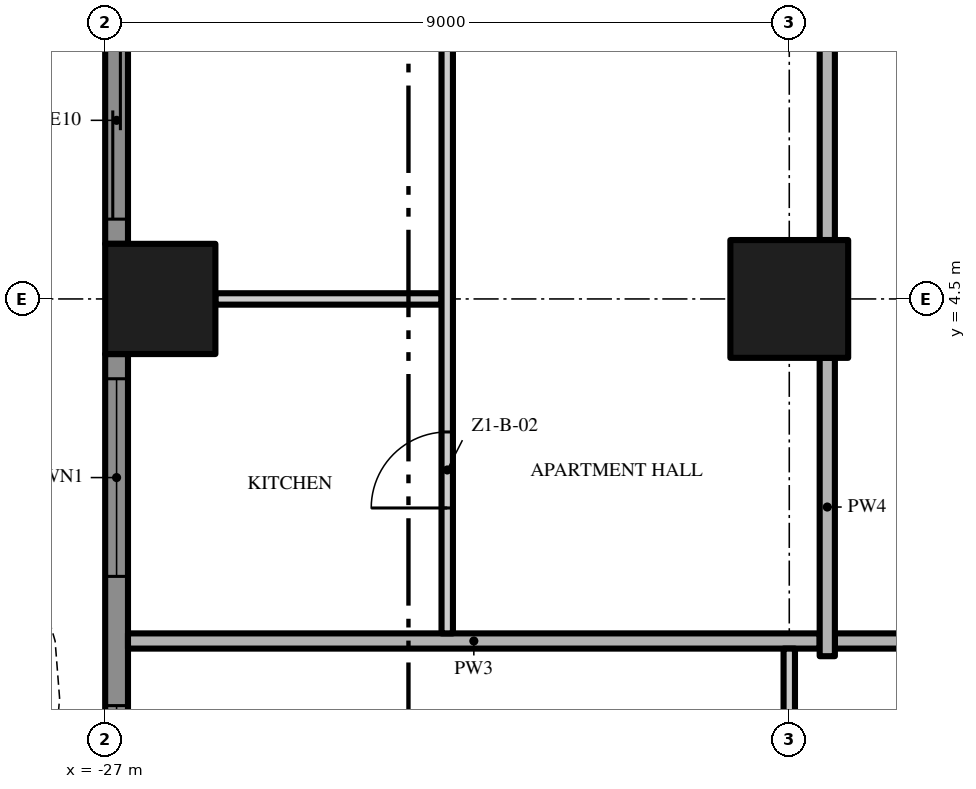
"""IFC4 building model, lengths in metres.
Left out: names, types, materials, properties, quantities, classifications, styles, units other than length and angle.
Written with IfcOpenShell. Run it as: python <this file> out.ifc"""

import sys

from ifc_helpers import new_model, si_unit, direction, frame, frame_2d, origin, origin_2d, place, context, subcontext, project, spatial, polyline, rectangle, outline, extrude, element, fill, save


model = new_model("IFC4")
c1 = context("Model", 3, precision=1e-05, world=origin(), true_north=direction((0.0, 1.0)))
c2 = subcontext(c1, "Body", "Model", "MODEL_VIEW")
j1 = project(units=[si_unit("LENGTHUNIT", "METRE"), si_unit("PLANEANGLEUNIT", "RADIAN")], contexts=[c1])
p1 = place(None, origin())
s1 = spatial("IfcSite", under=j1, at=p1, CompositionType="ELEMENT")
p2 = place(p1, origin())
s2 = spatial("IfcBuilding", under=s1, at=p2, CompositionType="ELEMENT")
p3 = place(p2, frame((0.0, 0.0, 30.2)))
s3 = spatial("IfcBuildingStorey", under=s2, at=p3, CompositionType="ELEMENT", Elevation=30.2)
p4 = place(p3, frame((-18.0, 4.5, 0.0), z_axis=(0.0, 0.0, 1.0), x_axis=(1.0, 0.0, 0.0)))
e1 = element("IfcColumn", 1, at=p4, inside=s3, PredefinedType="COLUMN", context=c2, shape_type="SweptSolid", body=[
    extrude(rectangle(XDim=1.55, YDim=1.55, at=origin_2d()), origin(), (0.0, 0.0, 1.0), 3.5),
])
p5 = place(p3, frame((-26.275, 4.5, 0.0), z_axis=(0.0, 0.0, 1.0), x_axis=(1.0, 0.0, 0.0)))
e2 = element("IfcColumn", 2, at=p5, inside=s3, PredefinedType="COLUMN", context=c2, shape_type="SweptSolid", body=[
    extrude(rectangle(XDim=1.45, YDim=1.45, at=origin_2d()), origin(), (0.0, 0.0, 1.0), 3.5),
])
p6 = place(p3, frame((-26.85, 5.225, 0.0), z_axis=(0.0, 0.0, 1.0), x_axis=(0.0, 1.0, 0.0)))
e3 = element("IfcWall", 3, at=p6, inside=s3, PredefinedType="SOLIDWALL", context=c2, shape_type="SweptSolid", body=[
    extrude(rectangle(XDim=7.55, YDim=0.3, at=frame_2d((3.775, 0.0))), origin(), (0.0, 0.0, 1.0), 3.5),
])
p7 = place(p6, frame((4.625, 0.0, 0.45)))
e4 = element("IfcOpeningElement", 4, at=p7, cuts=e3, PredefinedType="OPENING", context=c2, shape_type="SweptSolid", body=[
    extrude(rectangle(XDim=2.6, YDim=2.65, at=frame_2d((1.3, 1.325))), frame((0.0, 0.16, 0.0), z_axis=(0.0, -1.0, 0.0), x_axis=(1.0, 0.0, 0.0)), (0.0, 0.0, 1.0), 0.32),
])
p8 = place(p6, frame((0.325, 0.0, 0.0)))
e5 = element("IfcOpeningElement", 5, at=p8, cuts=e3, PredefinedType="OPENING", context=c2, shape_type="SweptSolid", body=[
    extrude(rectangle(XDim=2.6, YDim=2.4, at=frame_2d((1.3, 1.2))), frame((0.0, 0.16, 0.0), z_axis=(0.0, -1.0, 0.0), x_axis=(1.0, 0.0, 0.0)), (0.0, 0.0, 1.0), 0.32),
])
p9 = place(p3, frame((-26.85, -3.775, 0.0), z_axis=(0.0, 0.0, 1.0), x_axis=(0.0, 1.0, 0.0)))
e6 = element("IfcWall", 6, at=p9, inside=s3, PredefinedType="SOLIDWALL", context=c2, shape_type="SweptSolid", body=[
    extrude(rectangle(XDim=7.55, YDim=0.3, at=frame_2d((3.775, 0.0))), origin(), (0.0, 0.0, 1.0), 3.5),
])
p10 = place(p9, frame((4.625, 0.0, 0.45)))
e7 = element("IfcOpeningElement", 7, at=p10, cuts=e6, PredefinedType="OPENING", context=c2, shape_type="SweptSolid", body=[
    extrude(rectangle(XDim=2.6, YDim=2.65, at=frame_2d((1.3, 1.325))), frame((0.0, 0.16, 0.0), z_axis=(0.0, -1.0, 0.0), x_axis=(1.0, 0.0, 0.0)), (0.0, 0.0, 1.0), 0.32),
])
p11 = place(p9, frame((0.325, 0.0, 0.45)))
e8 = element("IfcOpeningElement", 8, at=p11, cuts=e6, PredefinedType="OPENING", context=c2, shape_type="SweptSolid", body=[
    extrude(rectangle(XDim=2.6, YDim=2.65, at=frame_2d((1.3, 1.325))), frame((0.0, 0.16, 0.0), z_axis=(0.0, -1.0, 0.0), x_axis=(1.0, 0.0, 0.0)), (0.0, 0.0, 1.0), 0.32),
])
p12 = place(p3, origin())
e9 = element("IfcWall", 9, at=p12, inside=s3, PredefinedType="USERDEFINED", context=c2, shape_type="SweptSolid", body=[
    extrude(outline(polyline([(-28.8, 18.0), (-28.095, 16.5), (-27.659, 15.0), (-27.6, 14.25), (-27.659, 13.5), (-28.095, 12.0), (-28.8, 10.5), (-29.505, 9.0), (-29.941, 7.5), (-30.0, 6.75), (-29.941, 6.0), (-29.505, 4.5), (-28.8, 3.0), (-28.095, 1.5), (-27.659, 0.0), (-27.6, -0.75), (-27.659, -1.5), (-28.095, -3.0), (-28.8, -4.5), (-29.505, -6.0), (-29.941, -7.5), (-30.0, -8.25), (-29.941, -9.0), (-29.505, -10.5), (-28.8, -12.0), (-28.095, -13.5), (-27.659, -15.0), (-27.6, -15.75), (-27.659, -16.5), (-28.095, -18.0), (-27.855, -18.07), (-27.411, -16.545), (-27.349, -15.75), (-27.411, -14.955), (-27.86, -13.411), (-28.574, -11.894), (-29.271, -10.411), (-29.694, -8.955), (-29.749, -8.25), (-29.694, -7.545), (-29.271, -6.089), (-28.574, -4.606), (-27.86, -3.089), (-27.411, -1.545), (-27.349, -0.75), (-27.411, 0.045), (-27.86, 1.589), (-28.574, 3.106), (-29.271, 4.589), (-29.694, 6.045), (-29.749, 6.75), (-29.694, 7.455), (-29.271, 8.911), (-28.574, 10.394), (-27.86, 11.911), (-27.411, 13.455), (-27.349, 14.25), (-27.411, 15.045), (-27.86, 16.589), (-28.574, 18.106), (-28.8, 18.0)])), origin(), (0.0, 0.0, 1.0), 0.9),
])
p13 = place(p3, frame((-17.4, 0.0, 0.0), z_axis=(0.0, 0.0, 1.0), x_axis=(1.0, 0.0, 0.0)))
e10 = element("IfcWall", 10, at=p13, inside=s3, PredefinedType="PARTITIONING", context=c2, shape_type="SweptSolid", body=[
    extrude(rectangle(XDim=12.8, YDim=0.2, at=frame_2d((6.4, 0.0))), origin(), (0.0, 0.0, 1.0), 3.5),
])
p14 = place(p3, frame((-26.7, 0.0, 0.0), z_axis=(0.0, 0.0, 1.0), x_axis=(1.0, 0.0, 0.0)))
e11 = element("IfcWall", 11, at=p14, inside=s3, PredefinedType="PARTITIONING", context=c2, shape_type="SweptSolid", body=[
    extrude(rectangle(XDim=9.1, YDim=0.2, at=frame_2d((4.55, 0.0))), origin(), (0.0, 0.0, 1.0), 3.5),
])
p15 = place(p3, frame((-25.55, 4.5, 0.0), z_axis=(0.0, 0.0, 1.0), x_axis=(1.0, 0.0, 0.0)))
e12 = element("IfcWall", 12, at=p15, inside=s3, PredefinedType="PARTITIONING", context=c2, shape_type="SweptSolid", body=[
    extrude(rectangle(XDim=2.975, YDim=0.15, at=frame_2d((1.488, 0.0))), origin(), (0.0, 0.0, 1.0), 3.5),
])
p16 = place(p3, frame((-22.5, 0.1, 0.0), z_axis=(0.0, 0.0, 1.0), x_axis=(0.0, 1.0, 0.0)))
e13 = element("IfcWall", 13, at=p16, inside=s3, PredefinedType="PARTITIONING", context=c2, shape_type="SweptSolid", body=[
    extrude(rectangle(XDim=17.175, YDim=0.15, at=frame_2d((8.588, 0.0))), origin(), (0.0, 0.0, 1.0), 3.5),
])
p17 = place(p16, frame((1.65, 0.0, 0.0)))
e14 = element("IfcOpeningElement", 14, at=p17, cuts=e13, PredefinedType="OPENING", context=c2, shape_type="SweptSolid", body=[
    extrude(rectangle(XDim=1.0, YDim=2.4, at=frame_2d((0.5, 1.2))), frame((0.0, 0.085, 0.0), z_axis=(0.0, -1.0, 0.0), x_axis=(1.0, 0.0, 0.0)), (0.0, 0.0, 1.0), 0.17),
])
p18 = place(p16, frame((8.0, 0.0, 0.0)))
e15 = element("IfcOpeningElement", 15, at=p18, cuts=e13, PredefinedType="OPENING", context=c2, shape_type="SweptSolid", body=[
    extrude(rectangle(XDim=1.8, YDim=2.4, at=frame_2d((0.9, 1.2))), frame((0.0, 0.085, 0.0), z_axis=(0.0, -1.0, 0.0), x_axis=(1.0, 0.0, 0.0)), (0.0, 0.0, 1.0), 0.17),
])
p19 = place(p16, frame((16.025, 0.0, 0.0)))
e16 = element("IfcOpeningElement", 16, at=p19, cuts=e13, PredefinedType="OPENING", context=c2, shape_type="SweptSolid", body=[
    extrude(rectangle(XDim=1.0, YDim=2.4, at=frame_2d((0.5, 1.2))), frame((0.0, 0.085, 0.0), z_axis=(0.0, -1.0, 0.0), x_axis=(1.0, 0.0, 0.0)), (0.0, 0.0, 1.0), 0.17),
])
p20 = place(p3, frame((-18.0, -3.725, 0.0), z_axis=(0.0, 0.0, 1.0), x_axis=(0.0, 1.0, 0.0)))
e17 = element("IfcWall", 17, at=p20, inside=s3, PredefinedType="PARTITIONING", context=c2, shape_type="SweptSolid", body=[
    extrude(rectangle(XDim=3.625, YDim=0.15, at=frame_2d((1.812, 0.0))), origin(), (0.0, 0.0, 1.0), 3.5),
])
p21 = place(p20, frame((0.75, 0.0, 0.0)))
e18 = element("IfcOpeningElement", 18, at=p21, cuts=e17, PredefinedType="OPENING", context=c2, shape_type="SweptSolid", body=[
    extrude(rectangle(XDim=1.5, YDim=2.4, at=frame_2d((0.75, 1.2))), frame((0.0, 0.085, 0.0), z_axis=(0.0, -1.0, 0.0), x_axis=(1.0, 0.0, 0.0)), (0.0, 0.0, 1.0), 0.17),
])
p22 = place(p3, frame((-17.5, -0.2, 0.0), z_axis=(0.0, 0.0, 1.0), x_axis=(0.0, 1.0, 0.0)))
e19 = element("IfcWall", 19, at=p22, inside=s3, PredefinedType="PARTITIONING", context=c2, shape_type="SweptSolid", body=[
    extrude(rectangle(XDim=3.925, YDim=0.2, at=frame_2d((1.962, 0.0))), origin(), (0.0, 0.0, 1.0), 3.5),
])
p23 = place(p3, frame((-17.5, 5.275, 0.0), z_axis=(0.0, 0.0, 1.0), x_axis=(0.0, 1.0, 0.0)))
e20 = element("IfcWall", 20, at=p23, inside=s3, PredefinedType="PARTITIONING", context=c2, shape_type="SweptSolid", body=[
    extrude(rectangle(XDim=7.45, YDim=0.2, at=frame_2d((3.725, 0.0))), origin(), (0.0, 0.0, 1.0), 3.5),
])
p24 = place(p23, frame((3.125, 0.0, 0.0)))
e21 = element("IfcOpeningElement", 21, at=p24, cuts=e20, PredefinedType="OPENING", context=c2, shape_type="SweptSolid", body=[
    extrude(rectangle(XDim=1.2, YDim=2.4, at=frame_2d((0.6, 1.2))), frame((0.0, 0.11, 0.0), z_axis=(0.0, -1.0, 0.0), x_axis=(1.0, 0.0, 0.0)), (0.0, 0.0, 1.0), 0.22),
])
p25 = place(p8, origin())
e22 = element("IfcDoor", 22, at=p25, inside=s3, OperationType="SINGLE_SWING_LEFT", PredefinedType="DOOR", context=c2, shape_type="SweptSolid", body=[
    extrude(rectangle(XDim=2.6, YDim=2.4, at=frame_2d((1.3, 1.2))), frame((0.0, 0.025, 0.0), z_axis=(0.0, -1.0, 0.0), x_axis=(1.0, 0.0, 0.0)), (0.0, 0.0, 1.0), 0.05),
])
fill(e5, e22)
p26 = place(p10, origin())
e23 = element("IfcWindow", 23, at=p26, inside=s3, PartitioningType="SINGLE_PANEL", PredefinedType="WINDOW", context=c2, shape_type="SweptSolid", body=[
    extrude(rectangle(XDim=2.6, YDim=2.65, at=frame_2d((1.3, 1.325))), frame((0.0, 0.03, 0.0), z_axis=(0.0, -1.0, 0.0), x_axis=(1.0, 0.0, 0.0)), (0.0, 0.0, 1.0), 0.06),
])
fill(e7, e23)
p27 = place(p11, origin())
e24 = element("IfcWindow", 24, at=p27, inside=s3, PartitioningType="SINGLE_PANEL", PredefinedType="WINDOW", context=c2, shape_type="SweptSolid", body=[
    extrude(rectangle(XDim=2.6, YDim=2.65, at=frame_2d((1.3, 1.325))), frame((0.0, 0.03, 0.0), z_axis=(0.0, -1.0, 0.0), x_axis=(1.0, 0.0, 0.0)), (0.0, 0.0, 1.0), 0.06),
])
fill(e8, e24)
p28 = place(p17, origin())
e25 = element("IfcDoor", 25, at=p28, inside=s3, OperationType="SINGLE_SWING_LEFT", PredefinedType="DOOR", context=c2, shape_type="SweptSolid", body=[
    extrude(rectangle(XDim=1.0, YDim=2.4, at=frame_2d((0.5, 1.2))), frame((0.0, 0.025, 0.0), z_axis=(0.0, -1.0, 0.0), x_axis=(1.0, 0.0, 0.0)), (0.0, 0.0, 1.0), 0.05),
])
fill(e14, e25)
save(model, sys.argv[1])
